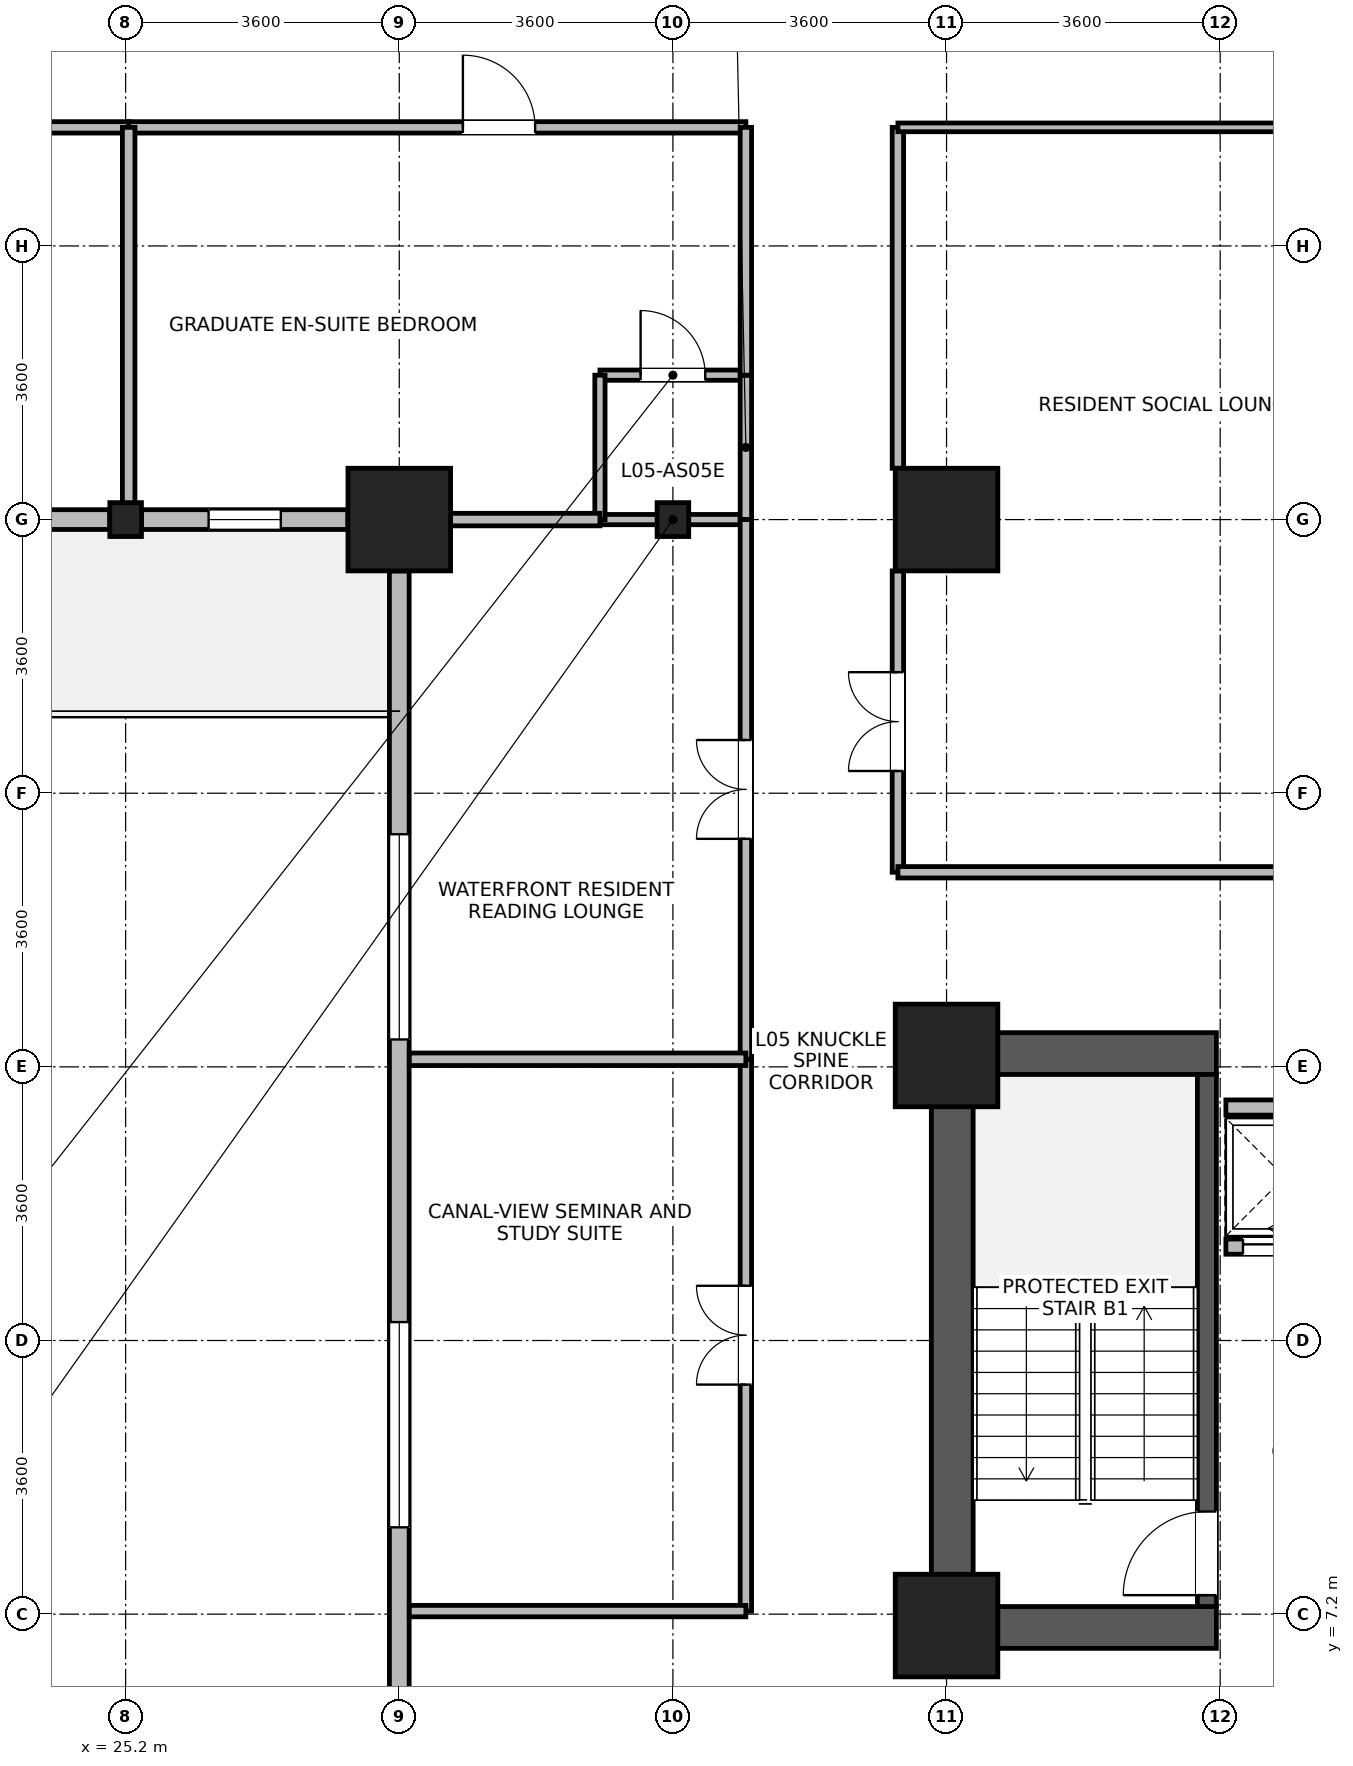
"""IFC4 building model, lengths in metres.
Left out: names, types, materials, properties, quantities, classifications, styles, units other than length and angle.
Written with IfcOpenShell. Run it as: python <this file> out.ifc"""

import sys

from ifc_helpers import new_model, si_unit, direction, frame, frame_2d, origin, origin_2d, place, context, subcontext, project, spatial, rectangle, i_section, extrude, source, transform, mapped, element, fill, save


model = new_model("IFC4")
c1 = context("Model", 3, precision=1e-05, world=origin(), true_north=direction((0.0, 1.0)))
c2 = subcontext(c1, "Body", "Model", "MODEL_VIEW")
j1 = project(units=[si_unit("LENGTHUNIT", "METRE"), si_unit("PLANEANGLEUNIT", "RADIAN")], contexts=[c1])
p1 = place(None, origin())
s1 = spatial("IfcSite", under=j1, at=p1, CompositionType="ELEMENT")
p2 = place(p1, origin())
s2 = spatial("IfcBuilding", under=s1, at=p2, CompositionType="ELEMENT")
p3 = place(p2, frame((0.0, 0.0, 25.3)))
s3 = spatial("IfcBuildingStorey", under=s2, at=p3, CompositionType="ELEMENT", Elevation=25.3)
p4 = place(p3, frame((36.075, 6.75, 0.0), z_axis=(0.0, 0.0, 1.0), x_axis=(0.0, 1.0, 0.0)))
e1 = element("IfcWall", 1, at=p4, inside=s3, PredefinedType="SHEAR", context=c2, shape_type="SweptSolid", body=[
    extrude(rectangle(XDim=8.1, YDim=0.55, at=frame_2d((4.05, 0.0))), origin(), (0.0, 0.0, 1.0), 3.45),
])
for number, where, z_axis, x_axis in (
    (2, (36.35, 7.025, 0.0), (0.0, 0.0, 1.0), (1.0, 0.0, 0.0)),
    (3, (36.35, 14.575, 0.0), (0.0, 0.0, 1.0), (1.0, 0.0, 0.0)),
):
    element("IfcWall", number, at=place(p3, frame(where, z_axis=z_axis, x_axis=x_axis)), inside=s3, PredefinedType="SHEAR", context=c2, shape_type="SweptSolid", body=[
        extrude(rectangle(XDim=3.2, YDim=0.55, at=frame_2d((1.6, 0.0))), origin(), (0.0, 0.0, 1.0), 3.45),
    ])
p5 = place(p3, frame((39.425, 7.3, 0.0), z_axis=(0.0, 0.0, 1.0), x_axis=(0.0, 1.0, 0.0)))
e4 = element("IfcWall", 4, at=p5, inside=s3, PredefinedType="SHEAR", context=c2, shape_type="SweptSolid", body=[
    extrude(rectangle(XDim=7.0, YDim=0.25, at=frame_2d((3.5, 0.0))), origin(), (0.0, 0.0, 1.0), 3.45),
])
p6 = place(p5, frame((0.15, 0.0, 0.0)))
e5 = element("IfcOpeningElement", 5, at=p6, cuts=e4, PredefinedType="OPENING", context=c2, shape_type="SweptSolid", body=[
    extrude(rectangle(XDim=1.1, YDim=2.08, at=frame_2d((0.55, 1.04))), frame((0.0, 0.135, 0.0), z_axis=(0.0, -1.0, 0.0), x_axis=(1.0, 0.0, 0.0)), (0.0, 0.0, 1.0), 0.27),
])
m1 = source(origin(), c2, "Body", "SweptSolid", [
    extrude(rectangle(XDim=1.35, YDim=1.35, at=origin_2d()), origin(), (0.0, 0.0, 1.0), 3.7),
])
for number, where, z_axis, x_axis in (
    (6, (28.8, 21.6, 0.0), (0.0, 0.0, 1.0), (1.0, 0.0, 0.0)),
    (7, (36.0, 21.6, 0.0), (0.0, 0.0, 1.0), (1.0, 0.0, 0.0)),
    (8, (36.0, 7.05, 0.0), (0.0, 0.0, 1.0), (1.0, 0.0, 0.0)),
    (9, (36.0, 14.55, 0.0), (0.0, 0.0, 1.0), (1.0, 0.0, 0.0)),
):
    element("IfcColumn", number, at=place(p3, frame(where, z_axis=z_axis, x_axis=x_axis)), inside=s3, PredefinedType="COLUMN", context=c2, shape_type="MappedRepresentation", body=[
        mapped(m1, transform((0.0, 0.0, 0.0), x_axis=(1.0, 0.0, 0.0), y_axis=(0.0, 1.0, 0.0), z_axis=(0.0, 0.0, 1.0), scale=1.0)),
    ])
m2 = source(origin(), c2, "Body", "SweptSolid", [
    extrude(i_section(OverallWidth=0.416, OverallDepth=0.446, WebThickness=0.029, FlangeThickness=0.04, FilletRadius=0.015, at=origin_2d()), origin(), (0.0, 0.0, 1.0), 3.7),
])
for number, where, z_axis, x_axis in (
    (10, (25.2, 21.6, 0.0), (0.0, 0.0, 1.0), (1.0, 0.0, 0.0)),
    (11, (32.4, 21.6, 0.0), (0.0, 0.0, 1.0), (1.0, 0.0, 0.0)),
):
    element("IfcColumn", number, at=place(p3, frame(where, z_axis=z_axis, x_axis=x_axis)), inside=s3, PredefinedType="COLUMN", context=c2, shape_type="MappedRepresentation", body=[
        mapped(m2, transform((0.0, 0.0, 0.0), x_axis=(1.0, 0.0, 0.0), y_axis=(0.0, 1.0, 0.0), z_axis=(0.0, 0.0, 1.0), scale=1.0)),
    ])
p7 = place(p3, frame((24.991, 21.6, 0.0), z_axis=(0.0, 0.0, 1.0), x_axis=(-1.0, 0.0, 0.0)))
e12 = element("IfcWall", 12, at=p7, inside=s3, PredefinedType="STANDARD", context=c2, shape_type="SweptSolid", body=[
    extrude(rectangle(XDim=2.715, YDim=0.26, at=frame_2d((1.357, 0.0))), origin(), (0.0, 0.0, 1.0), 2.93),
])
p8 = place(p7, frame((0.883, 0.0, 0.85)))
e13 = element("IfcOpeningElement", 13, at=p8, cuts=e12, PredefinedType="OPENING", context=c2, shape_type="SweptSolid", body=[
    extrude(rectangle(XDim=0.95, YDim=1.75, at=frame_2d((0.475, 0.875))), frame((0.0, 0.14, 0.0), z_axis=(0.0, -1.0, 0.0), x_axis=(1.0, 0.0, 0.0)), (0.0, 0.0, 1.0), 0.28),
])
p9 = place(p3, frame((28.124, 21.6, 0.0), z_axis=(0.0, 0.0, 1.0), x_axis=(-1.0, 0.0, 0.0)))
e14 = element("IfcWall", 14, at=p9, inside=s3, PredefinedType="STANDARD", context=c2, shape_type="SweptSolid", body=[
    extrude(rectangle(XDim=2.715, YDim=0.26, at=frame_2d((1.357, 0.0))), origin(), (0.0, 0.0, 1.0), 2.93),
])
p10 = place(p9, frame((0.883, 0.0, 0.85)))
e15 = element("IfcOpeningElement", 15, at=p10, cuts=e14, PredefinedType="OPENING", context=c2, shape_type="SweptSolid", body=[
    extrude(rectangle(XDim=0.95, YDim=1.75, at=frame_2d((0.475, 0.875))), frame((0.0, 0.14, 0.0), z_axis=(0.0, -1.0, 0.0), x_axis=(1.0, 0.0, 0.0)), (0.0, 0.0, 1.0), 0.28),
])
p11 = place(p3, frame((28.8, 1.67, 0.0), z_axis=(0.0, 0.0, 1.0), x_axis=(0.0, 1.0, 0.0)))
e16 = element("IfcWall", 16, at=p11, inside=s3, PredefinedType="STANDARD", context=c2, shape_type="SweptSolid", body=[
    extrude(rectangle(XDim=19.254, YDim=0.26, at=frame_2d((9.627, 0.0))), origin(), (0.0, 0.0, 1.0), 3.43),
])
p12 = place(p11, frame((6.673, 0.0, 0.85)))
e17 = element("IfcOpeningElement", 17, at=p12, cuts=e16, PredefinedType="OPENING", context=c2, shape_type="SweptSolid", body=[
    extrude(rectangle(XDim=2.7, YDim=2.05, at=frame_2d((1.35, 1.025))), frame((0.0, 0.14, 0.0), z_axis=(0.0, -1.0, 0.0), x_axis=(1.0, 0.0, 0.0)), (0.0, 0.0, 1.0), 0.28),
])
p13 = place(p11, frame((13.091, 0.0, 0.85)))
e18 = element("IfcOpeningElement", 18, at=p13, cuts=e16, PredefinedType="OPENING", context=c2, shape_type="SweptSolid", body=[
    extrude(rectangle(XDim=2.7, YDim=2.05, at=frame_2d((1.35, 1.025))), frame((0.0, 0.14, 0.0), z_axis=(0.0, -1.0, 0.0), x_axis=(1.0, 0.0, 0.0)), (0.0, 0.0, 1.0), 0.28),
])
p14 = place(p3, frame((39.675, 12.035, 0.0), z_axis=(0.0, 0.0, 1.0), x_axis=(1.0, 0.0, 0.0)))
e19 = element("IfcWall", 19, at=p14, inside=s3, PredefinedType="PARTITIONING", context=c2, shape_type="SweptSolid", body=[
    extrude(rectangle(XDim=1.55, YDim=0.2, at=frame_2d((0.775, 0.0))), origin(), (0.0, 0.0, 1.0), 3.43),
])
p15 = place(p14, frame((0.225, 0.0, 0.0)))
e20 = element("IfcOpeningElement", 20, at=p15, cuts=e19, PredefinedType="OPENING", context=c2, shape_type="SweptSolid", body=[
    extrude(rectangle(XDim=1.1, YDim=2.12, at=frame_2d((0.55, 1.06))), frame((0.0, 0.11, 0.0), z_axis=(0.0, -1.0, 0.0), x_axis=(1.0, 0.0, 0.0)), (0.0, 0.0, 1.0), 0.22),
])
p16 = place(p3, frame((39.675, 13.865, 0.0), z_axis=(0.0, 0.0, 1.0), x_axis=(1.0, 0.0, 0.0)))
e21 = element("IfcWall", 21, at=p16, inside=s3, PredefinedType="PARTITIONING", context=c2, shape_type="SweptSolid", body=[
    extrude(rectangle(XDim=1.55, YDim=0.2, at=frame_2d((0.775, 0.0))), origin(), (0.0, 0.0, 1.0), 3.43),
])
p17 = place(p3, frame((31.44, 21.6, 0.0), z_axis=(0.0, 0.0, 1.0), x_axis=(1.0, 0.0, 0.0)))
e22 = element("IfcWall", 22, at=p17, inside=s3, PredefinedType="PARTITIONING", context=c2, shape_type="SweptSolid", body=[
    extrude(rectangle(XDim=1.92, YDim=0.135, at=frame_2d((0.96, 0.0))), origin(), (0.0, 0.0, 1.0), 2.93),
])
p18 = place(p3, frame((31.44, 23.5, 0.0), z_axis=(0.0, 0.0, 1.0), x_axis=(1.0, 0.0, 0.0)))
e23 = element("IfcWall", 23, at=p18, inside=s3, PredefinedType="PARTITIONING", context=c2, shape_type="SweptSolid", body=[
    extrude(rectangle(XDim=1.92, YDim=0.135, at=frame_2d((0.96, 0.0))), origin(), (0.0, 0.0, 1.0), 3.43),
])
p19 = place(p18, frame((0.535, 0.0, 0.0)))
e24 = element("IfcOpeningElement", 24, at=p19, cuts=e23, PredefinedType="OPENING", context=c2, shape_type="SweptSolid", body=[
    extrude(rectangle(XDim=0.85, YDim=2.04, at=frame_2d((0.425, 1.02))), frame((0.0, 0.078, 0.0), z_axis=(0.0, -1.0, 0.0), x_axis=(1.0, 0.0, 0.0)), (0.0, 0.0, 1.0), 0.155),
])
p20 = place(p3, frame((31.44, 21.6, 0.0), z_axis=(0.0, 0.0, 1.0), x_axis=(0.0, 1.0, 0.0)))
e25 = element("IfcWall", 25, at=p20, inside=s3, PredefinedType="PARTITIONING", context=c2, shape_type="SweptSolid", body=[
    extrude(rectangle(XDim=1.9, YDim=0.135, at=frame_2d((0.95, 0.0))), origin(), (0.0, 0.0, 1.0), 3.43),
])
p21 = place(p3, frame((33.36, 21.6, 0.0), z_axis=(0.0, 0.0, 1.0), x_axis=(0.0, 1.0, 0.0)))
e26 = element("IfcWall", 26, at=p21, inside=s3, PredefinedType="PARTITIONING", context=c2, shape_type="SweptSolid", body=[
    extrude(rectangle(XDim=1.9, YDim=0.15, at=frame_2d((0.95, 0.0))), origin(), (0.0, 0.0, 1.0), 3.43),
])
p22 = place(p3, frame((35.36, 16.96, 0.0), z_axis=(0.0, 0.0, 1.0), x_axis=(0.0, 1.0, 0.0)))
e27 = element("IfcWall", 27, at=p22, inside=s3, PredefinedType="PARTITIONING", context=c2, shape_type="SweptSolid", body=[
    extrude(rectangle(XDim=3.965, YDim=0.15, at=frame_2d((1.982, 0.0))), origin(), (0.0, 0.0, 1.0), 3.43),
])
p23 = place(p22, frame((1.333, 0.0, 0.0)))
e28 = element("IfcOpeningElement", 28, at=p23, cuts=e27, PredefinedType="OPENING", context=c2, shape_type="SweptSolid", body=[
    extrude(rectangle(XDim=1.3, YDim=2.12, at=frame_2d((0.65, 1.06))), frame((0.0, 0.085, 0.0), z_axis=(0.0, -1.0, 0.0), x_axis=(1.0, 0.0, 0.0)), (0.0, 0.0, 1.0), 0.17),
])
p24 = place(p3, frame((35.36, 22.275, 0.0), z_axis=(0.0, 0.0, 1.0), x_axis=(0.0, 1.0, 0.0)))
e29 = element("IfcWall", 29, at=p24, inside=s3, PredefinedType="PARTITIONING", context=c2, shape_type="SweptSolid", body=[
    extrude(rectangle(XDim=4.485, YDim=0.15, at=frame_2d((2.243, 0.0))), origin(), (0.0, 0.0, 1.0), 3.43),
])
p25 = place(p3, frame((16.52, 26.76, 0.0), z_axis=(0.0, 0.0, 1.0), x_axis=(1.0, 0.0, 0.0)))
e30 = element("IfcWall", 30, at=p25, inside=s3, PredefinedType="PARTITIONING", context=c2, shape_type="SweptSolid", body=[
    extrude(rectangle(XDim=8.72, YDim=0.15, at=frame_2d((4.36, 0.0))), origin(), (0.0, 0.0, 1.0), 3.43),
])
p26 = place(p25, frame((3.71, 0.0, 0.0)))
e31 = element("IfcOpeningElement", 31, at=p26, cuts=e30, PredefinedType="OPENING", context=c2, shape_type="SweptSolid", body=[
    extrude(rectangle(XDim=1.3, YDim=2.12, at=frame_2d((0.65, 1.06))), frame((0.0, 0.085, 0.0), z_axis=(0.0, -1.0, 0.0), x_axis=(1.0, 0.0, 0.0)), (0.0, 0.0, 1.0), 0.17),
])
p27 = place(p3, frame((25.24, 26.76, 0.0), z_axis=(0.0, 0.0, 1.0), x_axis=(1.0, 0.0, 0.0)))
e32 = element("IfcWall", 32, at=p27, inside=s3, PredefinedType="PARTITIONING", context=c2, shape_type="SweptSolid", body=[
    extrude(rectangle(XDim=8.12, YDim=0.15, at=frame_2d((4.06, 0.0))), origin(), (0.0, 0.0, 1.0), 3.43),
])
p28 = place(p27, frame((4.397, 0.0, 0.0)))
e33 = element("IfcOpeningElement", 33, at=p28, cuts=e32, PredefinedType="OPENING", context=c2, shape_type="SweptSolid", body=[
    extrude(rectangle(XDim=0.95, YDim=2.1, at=frame_2d((0.475, 1.05))), frame((0.0, 0.085, 0.0), z_axis=(0.0, -1.0, 0.0), x_axis=(1.0, 0.0, 0.0)), (0.0, 0.0, 1.0), 0.17),
])
p29 = place(p3, frame((33.36, 7.24, 0.0), z_axis=(0.0, 0.0, 1.0), x_axis=(0.0, 1.0, 0.0)))
e34 = element("IfcWall", 34, at=p29, inside=s3, PredefinedType="PARTITIONING", context=c2, shape_type="SweptSolid", body=[
    extrude(rectangle(XDim=7.26, YDim=0.15, at=frame_2d((3.63, 0.0))), origin(), (0.0, 0.0, 1.0), 3.43),
])
p30 = place(p29, frame((2.98, 0.0, 0.0)))
e35 = element("IfcOpeningElement", 35, at=p30, cuts=e34, PredefinedType="OPENING", context=c2, shape_type="SweptSolid", body=[
    extrude(rectangle(XDim=1.3, YDim=2.12, at=frame_2d((0.65, 1.06))), frame((0.0, 0.085, 0.0), z_axis=(0.0, -1.0, 0.0), x_axis=(1.0, 0.0, 0.0)), (0.0, 0.0, 1.0), 0.17),
])
p31 = place(p3, frame((35.36, 16.96, 0.0), z_axis=(0.0, 0.0, 1.0), x_axis=(1.0, 0.0, 0.0)))
e36 = element("IfcWall", 36, at=p31, inside=s3, PredefinedType="PARTITIONING", context=c2, shape_type="SweptSolid", body=[
    extrude(rectangle(XDim=7.14, YDim=0.15, at=frame_2d((3.57, 0.0))), origin(), (0.0, 0.0, 1.0), 3.43),
])
p32 = place(p3, frame((33.36, 14.5, 0.0), z_axis=(0.0, 0.0, 1.0), x_axis=(0.0, 1.0, 0.0)))
e37 = element("IfcWall", 37, at=p32, inside=s3, PredefinedType="PARTITIONING", context=c2, shape_type="SweptSolid", body=[
    extrude(rectangle(XDim=7.1, YDim=0.15, at=frame_2d((3.55, 0.0))), origin(), (0.0, 0.0, 1.0), 3.43),
])
p33 = place(p32, frame((2.9, 0.0, 0.0)))
e38 = element("IfcOpeningElement", 38, at=p33, cuts=e37, PredefinedType="OPENING", context=c2, shape_type="SweptSolid", body=[
    extrude(rectangle(XDim=1.3, YDim=2.12, at=frame_2d((0.65, 1.06))), frame((0.0, 0.085, 0.0), z_axis=(0.0, -1.0, 0.0), x_axis=(1.0, 0.0, 0.0)), (0.0, 0.0, 1.0), 0.17),
])
p34 = place(p3, frame((28.932, 7.24, 0.0), z_axis=(0.0, 0.0, 1.0), x_axis=(1.0, 0.0, 0.0)))
e39 = element("IfcWall", 39, at=p34, inside=s3, PredefinedType="PARTITIONING", context=c2, shape_type="SweptSolid", body=[
    extrude(rectangle(XDim=4.428, YDim=0.15, at=frame_2d((2.214, 0.0))), origin(), (0.0, 0.0, 1.0), 3.43),
])
p35 = place(p3, frame((33.36, 23.5, 0.0), z_axis=(0.0, 0.0, 1.0), x_axis=(0.0, 1.0, 0.0)))
e40 = element("IfcWall", 40, at=p35, inside=s3, PredefinedType="PARTITIONING", context=c2, shape_type="SweptSolid", body=[
    extrude(rectangle(XDim=3.26, YDim=0.15, at=frame_2d((1.63, 0.0))), origin(), (0.0, 0.0, 1.0), 3.43),
])
p36 = place(p3, frame((35.36, 26.76, 0.0), z_axis=(0.0, 0.0, 1.0), x_axis=(1.0, 0.0, 0.0)))
e41 = element("IfcWall", 41, at=p36, inside=s3, PredefinedType="PARTITIONING", context=c2, shape_type="SweptSolid", body=[
    extrude(rectangle(XDim=7.14, YDim=0.115, at=frame_2d((3.57, 0.0))), origin(), (0.0, 0.0, 1.0), 3.43),
])
p37 = place(p3, frame((25.24, 21.732, 0.0), z_axis=(0.0, 0.0, 1.0), x_axis=(0.0, 1.0, 0.0)))
e42 = element("IfcWall", 42, at=p37, inside=s3, PredefinedType="PARTITIONING", context=c2, shape_type="SweptSolid", body=[
    extrude(rectangle(XDim=5.028, YDim=0.165, at=frame_2d((2.514, 0.0))), origin(), (0.0, 0.0, 1.0), 3.07),
])
p38 = place(p3, frame((28.932, 14.5, 0.0), z_axis=(0.0, 0.0, 1.0), x_axis=(1.0, 0.0, 0.0)))
e43 = element("IfcWall", 43, at=p38, inside=s3, PredefinedType="PARTITIONING", context=c2, shape_type="SweptSolid", body=[
    extrude(rectangle(XDim=4.428, YDim=0.165, at=frame_2d((2.214, 0.0))), origin(), (0.0, 0.0, 1.0), 3.43),
])
p39 = place(p3, frame((28.932, 21.6, 0.0), z_axis=(0.0, 0.0, 1.0), x_axis=(1.0, 0.0, 0.0)))
e44 = element("IfcWall", 44, at=p39, inside=s3, PredefinedType="PARTITIONING", context=c2, shape_type="SweptSolid", body=[
    extrude(rectangle(XDim=2.508, YDim=0.165, at=frame_2d((1.254, 0.0))), origin(), (0.0, 0.0, 1.0), 2.93),
])
p40 = place(p10, origin())
e45 = element("IfcWindow", 45, at=p40, inside=s3, PartitioningType="SINGLE_PANEL", PredefinedType="WINDOW", context=c2, shape_type="SweptSolid", body=[
    extrude(rectangle(XDim=0.95, YDim=1.75, at=frame_2d((0.475, 0.875))), frame((0.0, 0.03, 0.0), z_axis=(0.0, -1.0, 0.0), x_axis=(1.0, 0.0, 0.0)), (0.0, 0.0, 1.0), 0.06),
])
fill(e15, e45)
p41 = place(p12, origin())
e46 = element("IfcWindow", 46, at=p41, inside=s3, PartitioningType="SINGLE_PANEL", PredefinedType="WINDOW", context=c2, shape_type="SweptSolid", body=[
    extrude(rectangle(XDim=2.7, YDim=2.05, at=frame_2d((1.35, 1.025))), frame((0.0, 0.03, 0.0), z_axis=(0.0, -1.0, 0.0), x_axis=(1.0, 0.0, 0.0)), (0.0, 0.0, 1.0), 0.06),
])
fill(e17, e46)
p42 = place(p13, origin())
e47 = element("IfcWindow", 47, at=p42, inside=s3, PartitioningType="SINGLE_PANEL", PredefinedType="WINDOW", context=c2, shape_type="SweptSolid", body=[
    extrude(rectangle(XDim=2.7, YDim=2.05, at=frame_2d((1.35, 1.025))), frame((0.0, 0.03, 0.0), z_axis=(0.0, -1.0, 0.0), x_axis=(1.0, 0.0, 0.0)), (0.0, 0.0, 1.0), 0.06),
])
fill(e18, e47)
p43 = place(p6, origin())
e48 = element("IfcDoor", 48, at=p43, inside=s3, OperationType="SINGLE_SWING_LEFT", PredefinedType="DOOR", context=c2, shape_type="SweptSolid", body=[
    extrude(rectangle(XDim=1.1, YDim=2.08, at=frame_2d((0.55, 1.04))), frame((0.0, 0.025, 0.0), z_axis=(0.0, -1.0, 0.0), x_axis=(1.0, 0.0, 0.0)), (0.0, 0.0, 1.0), 0.05),
])
fill(e5, e48)
p44 = place(p15, origin())
e49 = element("IfcDoor", 49, at=p44, inside=s3, OperationType="SLIDING_TO_LEFT", PredefinedType="DOOR", context=c2, shape_type="SweptSolid", body=[
    extrude(rectangle(XDim=1.1, YDim=2.12, at=frame_2d((0.55, 1.06))), frame((0.0, 0.025, 0.0), z_axis=(0.0, -1.0, 0.0), x_axis=(1.0, 0.0, 0.0)), (0.0, 0.0, 1.0), 0.05),
])
fill(e20, e49)
p45 = place(p19, origin())
e50 = element("IfcDoor", 50, at=p45, inside=s3, OperationType="SINGLE_SWING_LEFT", PredefinedType="DOOR", context=c2, shape_type="SweptSolid", body=[
    extrude(rectangle(XDim=0.85, YDim=2.04, at=frame_2d((0.425, 1.02))), frame((0.0, 0.025, 0.0), z_axis=(0.0, -1.0, 0.0), x_axis=(1.0, 0.0, 0.0)), (0.0, 0.0, 1.0), 0.05),
])
fill(e24, e50)
p46 = place(p23, origin())
e51 = element("IfcDoor", 51, at=p46, inside=s3, OperationType="DOUBLE_DOOR_SINGLE_SWING", PredefinedType="DOOR", context=c2, shape_type="SweptSolid", body=[
    extrude(rectangle(XDim=1.3, YDim=2.12, at=frame_2d((0.65, 1.06))), frame((0.0, 0.025, 0.0), z_axis=(0.0, -1.0, 0.0), x_axis=(1.0, 0.0, 0.0)), (0.0, 0.0, 1.0), 0.05),
])
fill(e28, e51)
p47 = place(p28, origin())
e52 = element("IfcDoor", 52, at=p47, inside=s3, OperationType="SINGLE_SWING_LEFT", PredefinedType="DOOR", context=c2, shape_type="SweptSolid", body=[
    extrude(rectangle(XDim=0.95, YDim=2.1, at=frame_2d((0.475, 1.05))), frame((0.0, 0.025, 0.0), z_axis=(0.0, -1.0, 0.0), x_axis=(1.0, 0.0, 0.0)), (0.0, 0.0, 1.0), 0.05),
])
fill(e33, e52)
p48 = place(p30, origin())
e53 = element("IfcDoor", 53, at=p48, inside=s3, OperationType="DOUBLE_DOOR_SINGLE_SWING", PredefinedType="DOOR", context=c2, shape_type="SweptSolid", body=[
    extrude(rectangle(XDim=1.3, YDim=2.12, at=frame_2d((0.65, 1.06))), frame((0.0, 0.025, 0.0), z_axis=(0.0, -1.0, 0.0), x_axis=(1.0, 0.0, 0.0)), (0.0, 0.0, 1.0), 0.05),
])
fill(e35, e53)
p49 = place(p33, origin())
e54 = element("IfcDoor", 54, at=p49, inside=s3, OperationType="DOUBLE_DOOR_SINGLE_SWING", PredefinedType="DOOR", context=c2, shape_type="SweptSolid", body=[
    extrude(rectangle(XDim=1.3, YDim=2.12, at=frame_2d((0.65, 1.06))), frame((0.0, 0.025, 0.0), z_axis=(0.0, -1.0, 0.0), x_axis=(1.0, 0.0, 0.0)), (0.0, 0.0, 1.0), 0.05),
])
fill(e38, e54)
save(model, sys.argv[1])
